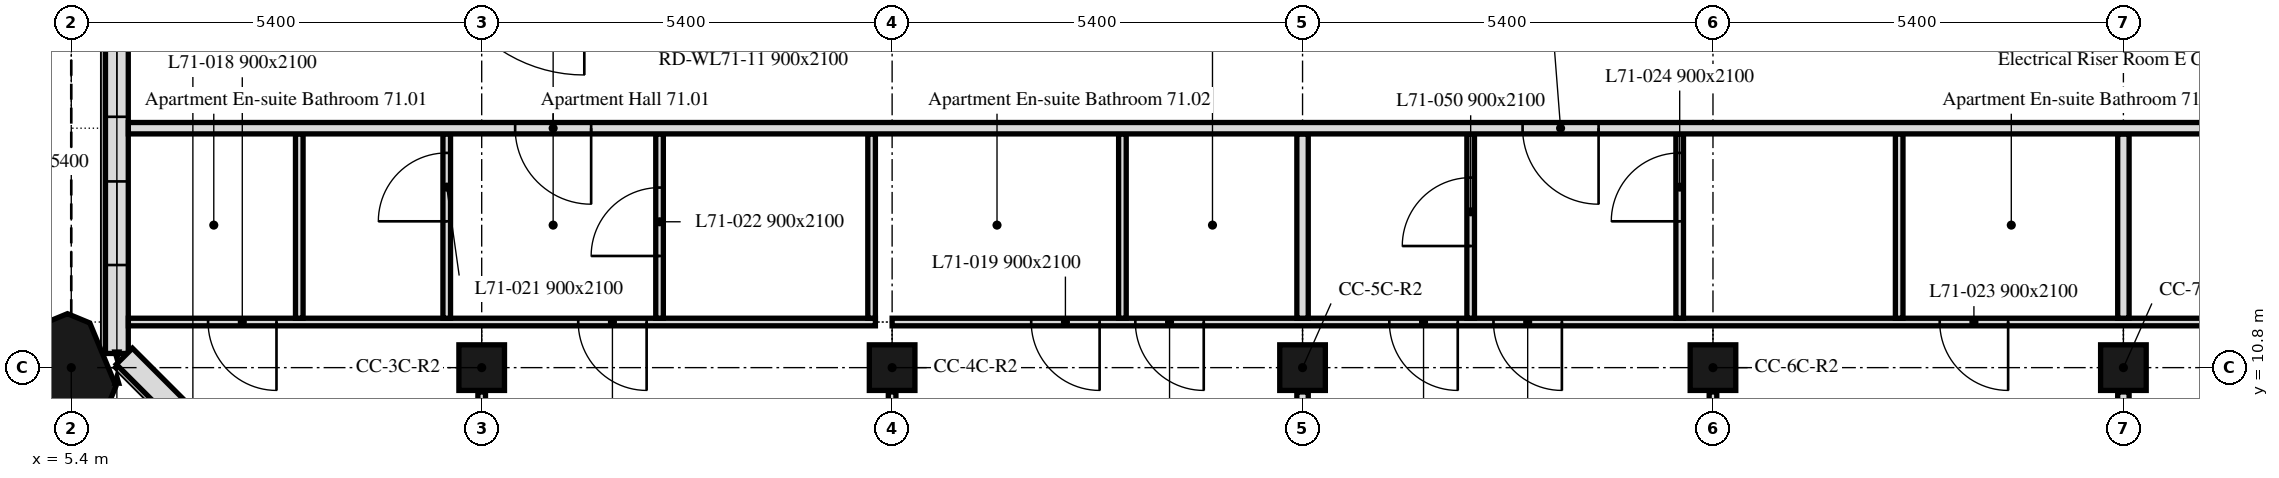
"""IFC4 building model, lengths in metres.
Left out: names, types, materials, properties, quantities, classifications, styles, units other than length and angle.
Written with IfcOpenShell. Run it as: python <this file> out.ifc"""

import sys

from ifc_helpers import new_model, si_unit, direction, frame, frame_2d, origin, origin_2d, place, context, subcontext, project, spatial, polyline, rectangle, outline, extrude, element, fill, save


model = new_model("IFC4")
c1 = context("Model", 3, precision=1e-05, world=origin(), true_north=direction((0.0, 1.0)))
c2 = subcontext(c1, "Body", "Model", "MODEL_VIEW")
j1 = project(units=[si_unit("LENGTHUNIT", "METRE"), si_unit("PLANEANGLEUNIT", "RADIAN")], contexts=[c1])
p1 = place(None, origin())
s1 = spatial("IfcSite", under=j1, at=p1, CompositionType="ELEMENT")
p2 = place(p1, origin())
s2 = spatial("IfcBuilding", under=s1, at=p2, CompositionType="ELEMENT")
p3 = place(p2, frame((0.0, 0.0, 288.4)))
s3 = spatial("IfcBuildingStorey", under=s2, at=p3, CompositionType="ELEMENT", Elevation=288.4)
p4 = place(p3, frame((5.4, 10.8, 0.0), z_axis=(0.0, 0.0, 1.0), x_axis=(-0.382683432365, 0.923879532511, 0.0)))
e1 = element("IfcColumn", 1, at=p4, inside=s3, PredefinedType="COLUMN", context=c2, shape_type="SweptSolid", body=[
    extrude(outline(polyline([(-0.45, -0.45), (0.45, -0.45), (0.675, -0.225), (0.675, 0.225), (0.45, 0.45), (-0.45, 0.45), (-0.675, 0.225), (-0.675, -0.225), (-0.45, -0.45)])), origin(), (0.0, 0.0, 1.0), 3.0),
])
for number, where, z_axis, x_axis in (
    (2, (10.8, 10.8, 0.0), (0.0, 0.0, 1.0), (1.0, 0.0, 0.0)),
    (3, (16.2, 10.8, 0.0), (0.0, 0.0, 1.0), (1.0, 0.0, 0.0)),
    (4, (21.6, 10.8, 0.0), (0.0, 0.0, 1.0), (1.0, 0.0, 0.0)),
    (5, (27.0, 10.8, 0.0), (0.0, 0.0, 1.0), (1.0, 0.0, 0.0)),
    (6, (32.4, 10.8, 0.0), (0.0, 0.0, 1.0), (1.0, 0.0, 0.0)),
):
    element("IfcColumn", number, at=place(p3, frame(where, z_axis=z_axis, x_axis=x_axis)), inside=s3, PredefinedType="COLUMN", context=c2, shape_type="SweptSolid", body=[
        extrude(rectangle(XDim=0.6, YDim=0.6, at=origin_2d()), origin(), (0.0, 0.0, 1.0), 3.0),
    ])
p5 = place(p3, frame((6.0, 16.2, 0.0), z_axis=(0.0, 0.0, 1.0), x_axis=(0.0, -1.0, 0.0)))
e7 = element("IfcWall", 7, at=p5, inside=s3, PredefinedType="SOLIDWALL", context=c2, shape_type="SweptSolid", body=[
    extrude(rectangle(XDim=5.214, YDim=0.3, at=frame_2d((2.607, 0.0))), origin(), (0.0, 0.0, 1.0), 3.0),
])
p6 = place(p5, frame((1.0, 0.0, 0.9)))
e8 = element("IfcOpeningElement", 8, at=p6, cuts=e7, PredefinedType="OPENING", context=c2, shape_type="SweptSolid", body=[
    extrude(rectangle(XDim=1.1, YDim=1.7, at=frame_2d((0.55, 0.85))), frame((0.0, 0.16, 0.0), z_axis=(0.0, -1.0, 0.0), x_axis=(1.0, 0.0, 0.0)), (0.0, 0.0, 1.0), 0.32),
])
p7 = place(p5, frame((2.95, 0.0, 0.9)))
e9 = element("IfcOpeningElement", 9, at=p7, cuts=e7, PredefinedType="OPENING", context=c2, shape_type="SweptSolid", body=[
    extrude(rectangle(XDim=1.1, YDim=1.7, at=frame_2d((0.55, 0.85))), frame((0.0, 0.16, 0.0), z_axis=(0.0, -1.0, 0.0), x_axis=(1.0, 0.0, 0.0)), (0.0, 0.0, 1.0), 0.32),
])
p8 = place(p3, frame((6.099, 10.949, 0.0), z_axis=(0.0, 0.0, 1.0), x_axis=(0.707106781187, -0.707106781187, 0.0)))
e10 = element("IfcWall", 10, at=p8, inside=s3, PredefinedType="SOLIDWALL", context=c2, shape_type="SweptSolid", body=[
    extrude(rectangle(XDim=6.86, YDim=0.3, at=frame_2d((3.43, 0.0))), origin(), (0.0, 0.0, 1.0), 3.0),
])
p9 = place(p8, frame((1.73, 0.0, 0.9)))
e11 = element("IfcOpeningElement", 11, at=p9, cuts=e10, PredefinedType="OPENING", context=c2, shape_type="SweptSolid", body=[
    extrude(rectangle(XDim=3.4, YDim=1.7, at=frame_2d((1.7, 0.85))), frame((0.0, 0.16, 0.0), z_axis=(0.0, -1.0, 0.0), x_axis=(1.0, 0.0, 0.0)), (0.0, 0.0, 1.0), 0.32),
])
p10 = place(p3, frame((15.98, 11.4, 0.0), z_axis=(0.0, 0.0, 1.0), x_axis=(-1.0, 0.0, 0.0)))
e12 = element("IfcWall", 12, at=p10, inside=s3, PredefinedType="PARTITIONING", context=c2, shape_type="SweptSolid", body=[
    extrude(rectangle(XDim=9.829, YDim=0.1, at=frame_2d((4.915, 0.0))), origin(), (0.0, 0.0, 1.0), 3.0),
])
p11 = place(p10, frame((7.88, 0.0, 0.0)))
e13 = element("IfcOpeningElement", 13, at=p11, cuts=e12, PredefinedType="OPENING", context=c2, shape_type="SweptSolid", body=[
    extrude(rectangle(XDim=0.9, YDim=2.1, at=frame_2d((0.45, 1.05))), frame((0.0, 0.05, 0.0), z_axis=(0.0, -1.0, 0.0), x_axis=(1.0, 0.0, 0.0)), (0.0, 0.0, 1.0), 0.1),
])
p12 = place(p10, frame((3.01, 0.0, 0.0)))
e14 = element("IfcOpeningElement", 14, at=p12, cuts=e12, PredefinedType="OPENING", context=c2, shape_type="SweptSolid", body=[
    extrude(rectangle(XDim=0.9, YDim=2.1, at=frame_2d((0.45, 1.05))), frame((0.0, 0.05, 0.0), z_axis=(0.0, -1.0, 0.0), x_axis=(1.0, 0.0, 0.0)), (0.0, 0.0, 1.0), 0.1),
])
p13 = place(p3, frame((10.8, 6.512, 0.0), z_axis=(0.0, 0.0, 1.0), x_axis=(0.0, 1.0, 0.0)))
e15 = element("IfcWall", 15, at=p13, inside=s3, PredefinedType="PARTITIONING", context=c2, shape_type="SweptSolid", body=[
    extrude(rectangle(XDim=3.968, YDim=0.1, at=frame_2d((1.984, 0.0))), origin(), (0.0, 0.0, 1.0), 3.0),
])
p14 = place(p13, frame((1.938, 0.0, 0.0)))
e16 = element("IfcOpeningElement", 16, at=p14, cuts=e15, PredefinedType="OPENING", context=c2, shape_type="SweptSolid", body=[
    extrude(rectangle(XDim=0.9, YDim=2.1, at=frame_2d((0.45, 1.05))), frame((0.0, 0.05, 0.0), z_axis=(0.0, -1.0, 0.0), x_axis=(1.0, 0.0, 0.0)), (0.0, 0.0, 1.0), 0.1),
])
p15 = place(p3, frame((16.2, 6.151, 0.0), z_axis=(0.0, 0.0, 1.0), x_axis=(0.0, 1.0, 0.0)))
e17 = element("IfcWall", 17, at=p15, inside=s3, PredefinedType="PARTITIONING", context=c2, shape_type="SweptSolid", body=[
    extrude(rectangle(XDim=4.329, YDim=0.1, at=frame_2d((2.165, 0.0))), origin(), (0.0, 0.0, 1.0), 3.0),
])
p16 = place(p15, frame((1.424, 0.0, 0.0)))
e18 = element("IfcOpeningElement", 18, at=p16, cuts=e17, PredefinedType="OPENING", context=c2, shape_type="SweptSolid", body=[
    extrude(rectangle(XDim=0.9, YDim=2.1, at=frame_2d((0.45, 1.05))), frame((0.0, 0.05, 0.0), z_axis=(0.0, -1.0, 0.0), x_axis=(1.0, 0.0, 0.0)), (0.0, 0.0, 1.0), 0.1),
])
p17 = place(p3, frame((37.8, 11.4, 0.0), z_axis=(0.0, 0.0, 1.0), x_axis=(-1.0, 0.0, 0.0)))
e19 = element("IfcWall", 19, at=p17, inside=s3, PredefinedType="PARTITIONING", context=c2, shape_type="SweptSolid", body=[
    extrude(rectangle(XDim=21.6, YDim=0.1, at=frame_2d((10.8, 0.0))), origin(), (0.0, 0.0, 1.0), 3.0),
])
p18 = place(p17, frame((18.87, 0.0, 0.0)))
e20 = element("IfcOpeningElement", 20, at=p18, cuts=e19, PredefinedType="OPENING", context=c2, shape_type="SweptSolid", body=[
    extrude(rectangle(XDim=0.9, YDim=2.1, at=frame_2d((0.45, 1.05))), frame((0.0, 0.05, 0.0), z_axis=(0.0, -1.0, 0.0), x_axis=(1.0, 0.0, 0.0)), (0.0, 0.0, 1.0), 0.1),
])
p19 = place(p17, frame((17.5, 0.0, 0.0)))
e21 = element("IfcOpeningElement", 21, at=p19, cuts=e19, PredefinedType="OPENING", context=c2, shape_type="SweptSolid", body=[
    extrude(rectangle(XDim=0.9, YDim=2.1, at=frame_2d((0.45, 1.05))), frame((0.0, 0.05, 0.0), z_axis=(0.0, -1.0, 0.0), x_axis=(1.0, 0.0, 0.0)), (0.0, 0.0, 1.0), 0.1),
])
p20 = place(p17, frame((6.917, 0.0, 0.0)))
e22 = element("IfcOpeningElement", 22, at=p20, cuts=e19, PredefinedType="OPENING", context=c2, shape_type="SweptSolid", body=[
    extrude(rectangle(XDim=0.9, YDim=2.1, at=frame_2d((0.45, 1.05))), frame((0.0, 0.05, 0.0), z_axis=(0.0, -1.0, 0.0), x_axis=(1.0, 0.0, 0.0)), (0.0, 0.0, 1.0), 0.1),
])
p21 = place(p17, frame((3.15, 0.0, 0.0)))
e23 = element("IfcOpeningElement", 23, at=p21, cuts=e19, PredefinedType="OPENING", context=c2, shape_type="SweptSolid", body=[
    extrude(rectangle(XDim=0.9, YDim=2.1, at=frame_2d((0.45, 1.05))), frame((0.0, 0.05, 0.0), z_axis=(0.0, -1.0, 0.0), x_axis=(1.0, 0.0, 0.0)), (0.0, 0.0, 1.0), 0.1),
])
p22 = place(p17, frame((14.158, 0.0, 0.0)))
e24 = element("IfcOpeningElement", 24, at=p22, cuts=e19, PredefinedType="OPENING", context=c2, shape_type="SweptSolid", body=[
    extrude(rectangle(XDim=0.9, YDim=2.1, at=frame_2d((0.45, 1.05))), frame((0.0, 0.05, 0.0), z_axis=(0.0, -1.0, 0.0), x_axis=(1.0, 0.0, 0.0)), (0.0, 0.0, 1.0), 0.1),
])
p23 = place(p17, frame((12.788, 0.0, 0.0)))
e25 = element("IfcOpeningElement", 25, at=p23, cuts=e19, PredefinedType="OPENING", context=c2, shape_type="SweptSolid", body=[
    extrude(rectangle(XDim=0.9, YDim=2.1, at=frame_2d((0.45, 1.05))), frame((0.0, 0.05, 0.0), z_axis=(0.0, -1.0, 0.0), x_axis=(1.0, 0.0, 0.0)), (0.0, 0.0, 1.0), 0.1),
])
p24 = place(p3, frame((21.6, 6.151, 0.0), z_axis=(0.0, 0.0, 1.0), x_axis=(0.0, 1.0, 0.0)))
e26 = element("IfcWall", 26, at=p24, inside=s3, PredefinedType="PARTITIONING", context=c2, shape_type="SweptSolid", body=[
    extrude(rectangle(XDim=4.329, YDim=0.15, at=frame_2d((2.165, 0.0))), origin(), (0.0, 0.0, 1.0), 3.0),
])
p25 = place(p3, frame((8.4, 11.45, 0.0), z_axis=(0.0, 0.0, 1.0), x_axis=(0.0, 1.0, 0.0)))
e27 = element("IfcWall", 27, at=p25, inside=s3, PredefinedType="PARTITIONING", context=c2, shape_type="SweptSolid", body=[
    extrude(rectangle(XDim=2.425, YDim=0.1, at=frame_2d((1.212, 0.0))), origin(), (0.0, 0.0, 1.0), 3.0),
])
p26 = place(p3, frame((10.34, 11.45, 0.0), z_axis=(0.0, 0.0, 1.0), x_axis=(0.0, 1.0, 0.0)))
e28 = element("IfcWall", 28, at=p26, inside=s3, PredefinedType="PARTITIONING", context=c2, shape_type="SweptSolid", body=[
    extrude(rectangle(XDim=2.425, YDim=0.1, at=frame_2d((1.212, 0.0))), origin(), (0.0, 0.0, 1.0), 3.0),
])
p27 = place(p26, frame((1.275, 0.0, 0.0)))
e29 = element("IfcOpeningElement", 29, at=p27, cuts=e28, PredefinedType="OPENING", context=c2, shape_type="SweptSolid", body=[
    extrude(rectangle(XDim=0.9, YDim=2.1, at=frame_2d((0.45, 1.05))), frame((0.0, 0.05, 0.0), z_axis=(0.0, -1.0, 0.0), x_axis=(1.0, 0.0, 0.0)), (0.0, 0.0, 1.0), 0.1),
])
p28 = place(p3, frame((13.14, 11.45, 0.0), z_axis=(0.0, 0.0, 1.0), x_axis=(0.0, 1.0, 0.0)))
e30 = element("IfcWall", 30, at=p28, inside=s3, PredefinedType="PARTITIONING", context=c2, shape_type="SweptSolid", body=[
    extrude(rectangle(XDim=2.425, YDim=0.1, at=frame_2d((1.212, 0.0))), origin(), (0.0, 0.0, 1.0), 3.0),
])
p29 = place(p28, frame((0.819, 0.0, 0.0)))
e31 = element("IfcOpeningElement", 31, at=p29, cuts=e30, PredefinedType="OPENING", context=c2, shape_type="SweptSolid", body=[
    extrude(rectangle(XDim=0.9, YDim=2.1, at=frame_2d((0.45, 1.05))), frame((0.0, 0.05, 0.0), z_axis=(0.0, -1.0, 0.0), x_axis=(1.0, 0.0, 0.0)), (0.0, 0.0, 1.0), 0.1),
])
for number, where, z_axis, x_axis in (
    (32, (15.93, 11.45, 0.0), (0.0, 0.0, 1.0), (0.0, 1.0, 0.0)),
    (33, (19.23, 11.45, 0.0), (0.0, 0.0, 1.0), (0.0, 1.0, 0.0)),
):
    element("IfcWall", number, at=place(p3, frame(where, z_axis=z_axis, x_axis=x_axis)), inside=s3, PredefinedType="PARTITIONING", context=c2, shape_type="SweptSolid", body=[
        extrude(rectangle(XDim=2.425, YDim=0.1, at=frame_2d((1.212, 0.0))), origin(), (0.0, 0.0, 1.0), 3.0),
    ])
p30 = place(p3, frame((21.6, 11.45, 0.0), z_axis=(0.0, 0.0, 1.0), x_axis=(0.0, 1.0, 0.0)))
e34 = element("IfcWall", 34, at=p30, inside=s3, PredefinedType="PARTITIONING", context=c2, shape_type="SweptSolid", body=[
    extrude(rectangle(XDim=2.425, YDim=0.15, at=frame_2d((1.212, 0.0))), origin(), (0.0, 0.0, 1.0), 3.0),
])
p31 = place(p3, frame((27.0, 6.151, 0.0), z_axis=(0.0, 0.0, 1.0), x_axis=(0.0, 1.0, 0.0)))
e35 = element("IfcWall", 35, at=p31, inside=s3, PredefinedType="PARTITIONING", context=c2, shape_type="SweptSolid", body=[
    extrude(rectangle(XDim=4.329, YDim=0.1, at=frame_2d((2.165, 0.0))), origin(), (0.0, 0.0, 1.0), 3.0),
])
p32 = place(p31, frame((1.424, 0.0, 0.0)))
e36 = element("IfcOpeningElement", 36, at=p32, cuts=e35, PredefinedType="OPENING", context=c2, shape_type="SweptSolid", body=[
    extrude(rectangle(XDim=0.9, YDim=2.1, at=frame_2d((0.45, 1.05))), frame((0.0, 0.05, 0.0), z_axis=(0.0, -1.0, 0.0), x_axis=(1.0, 0.0, 0.0)), (0.0, 0.0, 1.0), 0.1),
])
p33 = place(p3, frame((32.4, 6.151, 0.0), z_axis=(0.0, 0.0, 1.0), x_axis=(0.0, 1.0, 0.0)))
e37 = element("IfcWall", 37, at=p33, inside=s3, PredefinedType="PARTITIONING", context=c2, shape_type="SweptSolid", body=[
    extrude(rectangle(XDim=4.329, YDim=0.15, at=frame_2d((2.165, 0.0))), origin(), (0.0, 0.0, 1.0), 3.0),
])
p34 = place(p3, frame((23.812, 11.45, 0.0), z_axis=(0.0, 0.0, 1.0), x_axis=(0.0, 1.0, 0.0)))
e38 = element("IfcWall", 38, at=p34, inside=s3, PredefinedType="PARTITIONING", context=c2, shape_type="SweptSolid", body=[
    extrude(rectangle(XDim=2.425, YDim=0.1, at=frame_2d((1.212, 0.0))), origin(), (0.0, 0.0, 1.0), 3.0),
])
p35 = place(p34, frame((0.95, 0.0, 0.0)))
e39 = element("IfcOpeningElement", 39, at=p35, cuts=e38, PredefinedType="OPENING", context=c2, shape_type="SweptSolid", body=[
    extrude(rectangle(XDim=0.9, YDim=2.1, at=frame_2d((0.45, 1.05))), frame((0.0, 0.05, 0.0), z_axis=(0.0, -1.0, 0.0), x_axis=(1.0, 0.0, 0.0)), (0.0, 0.0, 1.0), 0.1),
])
p36 = place(p3, frame((26.562, 11.45, 0.0), z_axis=(0.0, 0.0, 1.0), x_axis=(0.0, 1.0, 0.0)))
e40 = element("IfcWall", 40, at=p36, inside=s3, PredefinedType="PARTITIONING", context=c2, shape_type="SweptSolid", body=[
    extrude(rectangle(XDim=2.425, YDim=0.1, at=frame_2d((1.212, 0.0))), origin(), (0.0, 0.0, 1.0), 3.0),
])
p37 = place(p36, frame((1.275, 0.0, 0.0)))
e41 = element("IfcOpeningElement", 41, at=p37, cuts=e40, PredefinedType="OPENING", context=c2, shape_type="SweptSolid", body=[
    extrude(rectangle(XDim=0.9, YDim=2.1, at=frame_2d((0.45, 1.05))), frame((0.0, 0.05, 0.0), z_axis=(0.0, -1.0, 0.0), x_axis=(1.0, 0.0, 0.0)), (0.0, 0.0, 1.0), 0.1),
])
p38 = place(p3, frame((29.45, 11.45, 0.0), z_axis=(0.0, 0.0, 1.0), x_axis=(0.0, 1.0, 0.0)))
e42 = element("IfcWall", 42, at=p38, inside=s3, PredefinedType="PARTITIONING", context=c2, shape_type="SweptSolid", body=[
    extrude(rectangle(XDim=2.425, YDim=0.1, at=frame_2d((1.212, 0.0))), origin(), (0.0, 0.0, 1.0), 3.0),
])
p39 = place(p3, frame((32.4, 11.45, 0.0), z_axis=(0.0, 0.0, 1.0), x_axis=(0.0, 1.0, 0.0)))
e43 = element("IfcWall", 43, at=p39, inside=s3, PredefinedType="PARTITIONING", context=c2, shape_type="SweptSolid", body=[
    extrude(rectangle(XDim=2.425, YDim=0.15, at=frame_2d((1.212, 0.0))), origin(), (0.0, 0.0, 1.0), 3.0),
])
p40 = place(p3, frame((47.849, 13.95, 0.0), z_axis=(0.0, 0.0, 1.0), x_axis=(-1.0, 0.0, 0.0)))
e44 = element("IfcWall", 44, at=p40, inside=s3, PredefinedType="PARTITIONING", context=c2, shape_type="SweptSolid", body=[
    extrude(rectangle(XDim=41.698, YDim=0.15, at=frame_2d((20.849, 0.0))), origin(), (0.0, 0.0, 1.0), 3.0),
])
p41 = place(p40, frame((35.609, 0.0, 0.0)))
e45 = element("IfcOpeningElement", 45, at=p41, cuts=e44, PredefinedType="OPENING", context=c2, shape_type="SweptSolid", body=[
    extrude(rectangle(XDim=1.0, YDim=2.1, at=frame_2d((0.5, 1.05))), frame((0.0, 0.075, 0.0), z_axis=(0.0, -1.0, 0.0), x_axis=(1.0, 0.0, 0.0)), (0.0, 0.0, 1.0), 0.15),
])
p42 = place(p40, frame((22.354, 0.0, 0.0)))
e46 = element("IfcOpeningElement", 46, at=p42, cuts=e44, PredefinedType="OPENING", context=c2, shape_type="SweptSolid", body=[
    extrude(rectangle(XDim=1.0, YDim=2.1, at=frame_2d((0.5, 1.05))), frame((0.0, 0.075, 0.0), z_axis=(0.0, -1.0, 0.0), x_axis=(1.0, 0.0, 0.0)), (0.0, 0.0, 1.0), 0.15),
])
p43 = place(p40, frame((8.049, 0.0, 0.0)))
e47 = element("IfcOpeningElement", 47, at=p43, cuts=e44, PredefinedType="OPENING", context=c2, shape_type="SweptSolid", body=[
    extrude(rectangle(XDim=1.0, YDim=2.1, at=frame_2d((0.5, 1.05))), frame((0.0, 0.075, 0.0), z_axis=(0.0, -1.0, 0.0), x_axis=(1.0, 0.0, 0.0)), (0.0, 0.0, 1.0), 0.15),
])
p44 = place(p6, origin())
e48 = element("IfcWindow", 48, at=p44, inside=s3, PartitioningType="SINGLE_PANEL", PredefinedType="WINDOW", context=c2, shape_type="SweptSolid", body=[
    extrude(rectangle(XDim=1.1, YDim=1.7, at=frame_2d((0.55, 0.85))), frame((0.0, 0.03, 0.0), z_axis=(0.0, -1.0, 0.0), x_axis=(1.0, 0.0, 0.0)), (0.0, 0.0, 1.0), 0.06),
])
fill(e8, e48)
p45 = place(p7, origin())
e49 = element("IfcWindow", 49, at=p45, inside=s3, PartitioningType="SINGLE_PANEL", PredefinedType="WINDOW", context=c2, shape_type="SweptSolid", body=[
    extrude(rectangle(XDim=1.1, YDim=1.7, at=frame_2d((0.55, 0.85))), frame((0.0, 0.03, 0.0), z_axis=(0.0, -1.0, 0.0), x_axis=(1.0, 0.0, 0.0)), (0.0, 0.0, 1.0), 0.06),
])
fill(e9, e49)
p46 = place(p11, origin())
e50 = element("IfcDoor", 50, at=p46, inside=s3, OperationType="SINGLE_SWING_RIGHT", PredefinedType="DOOR", context=c2, shape_type="SweptSolid", body=[
    extrude(rectangle(XDim=0.9, YDim=2.1, at=frame_2d((0.45, 1.05))), frame((0.0, 0.025, 0.0), z_axis=(0.0, -1.0, 0.0), x_axis=(1.0, 0.0, 0.0)), (0.0, 0.0, 1.0), 0.05),
])
fill(e13, e50)
p47 = place(p18, origin())
e51 = element("IfcDoor", 51, at=p47, inside=s3, OperationType="SINGLE_SWING_LEFT", PredefinedType="DOOR", context=c2, shape_type="SweptSolid", body=[
    extrude(rectangle(XDim=0.9, YDim=2.1, at=frame_2d((0.45, 1.05))), frame((0.0, 0.025, 0.0), z_axis=(0.0, -1.0, 0.0), x_axis=(1.0, 0.0, 0.0)), (0.0, 0.0, 1.0), 0.05),
])
fill(e20, e51)
p48 = place(p19, origin())
e52 = element("IfcDoor", 52, at=p48, inside=s3, OperationType="SINGLE_SWING_RIGHT", PredefinedType="DOOR", context=c2, shape_type="SweptSolid", body=[
    extrude(rectangle(XDim=0.9, YDim=2.1, at=frame_2d((0.45, 1.05))), frame((0.0, 0.025, 0.0), z_axis=(0.0, -1.0, 0.0), x_axis=(1.0, 0.0, 0.0)), (0.0, 0.0, 1.0), 0.05),
])
fill(e21, e52)
p49 = place(p27, origin())
e53 = element("IfcDoor", 53, at=p49, inside=s3, OperationType="SINGLE_SWING_RIGHT", PredefinedType="DOOR", context=c2, shape_type="SweptSolid", body=[
    extrude(rectangle(XDim=0.9, YDim=2.1, at=frame_2d((0.45, 1.05))), frame((0.0, 0.025, 0.0), z_axis=(0.0, -1.0, 0.0), x_axis=(1.0, 0.0, 0.0)), (0.0, 0.0, 1.0), 0.05),
])
fill(e29, e53)
p50 = place(p29, origin())
e54 = element("IfcDoor", 54, at=p50, inside=s3, OperationType="SINGLE_SWING_LEFT", PredefinedType="DOOR", context=c2, shape_type="SweptSolid", body=[
    extrude(rectangle(XDim=0.9, YDim=2.1, at=frame_2d((0.45, 1.05))), frame((0.0, 0.025, 0.0), z_axis=(0.0, -1.0, 0.0), x_axis=(1.0, 0.0, 0.0)), (0.0, 0.0, 1.0), 0.05),
])
fill(e31, e54)
p51 = place(p20, origin())
e55 = element("IfcDoor", 55, at=p51, inside=s3, OperationType="SINGLE_SWING_LEFT", PredefinedType="DOOR", context=c2, shape_type="SweptSolid", body=[
    extrude(rectangle(XDim=0.9, YDim=2.1, at=frame_2d((0.45, 1.05))), frame((0.0, 0.025, 0.0), z_axis=(0.0, -1.0, 0.0), x_axis=(1.0, 0.0, 0.0)), (0.0, 0.0, 1.0), 0.05),
])
fill(e22, e55)
p52 = place(p37, origin())
e56 = element("IfcDoor", 56, at=p52, inside=s3, OperationType="SINGLE_SWING_LEFT", PredefinedType="DOOR", context=c2, shape_type="SweptSolid", body=[
    extrude(rectangle(XDim=0.9, YDim=2.1, at=frame_2d((0.45, 1.05))), frame((0.0, 0.025, 0.0), z_axis=(0.0, -1.0, 0.0), x_axis=(1.0, 0.0, 0.0)), (0.0, 0.0, 1.0), 0.05),
])
fill(e41, e56)
p53 = place(p22, origin())
e57 = element("IfcDoor", 57, at=p53, inside=s3, OperationType="SINGLE_SWING_RIGHT", PredefinedType="DOOR", context=c2, shape_type="SweptSolid", body=[
    extrude(rectangle(XDim=0.9, YDim=2.1, at=frame_2d((0.45, 1.05))), frame((0.0, 0.025, 0.0), z_axis=(0.0, -1.0, 0.0), x_axis=(1.0, 0.0, 0.0)), (0.0, 0.0, 1.0), 0.05),
])
fill(e24, e57)
p54 = place(p35, origin())
e58 = element("IfcDoor", 58, at=p54, inside=s3, OperationType="SINGLE_SWING_LEFT", PredefinedType="DOOR", context=c2, shape_type="SweptSolid", body=[
    extrude(rectangle(XDim=0.9, YDim=2.1, at=frame_2d((0.45, 1.05))), frame((0.0, 0.025, 0.0), z_axis=(0.0, -1.0, 0.0), x_axis=(1.0, 0.0, 0.0)), (0.0, 0.0, 1.0), 0.05),
])
fill(e39, e58)
p55 = place(p12, origin())
e59 = element("IfcDoor", 59, at=p55, inside=s3, OperationType="SINGLE_SWING_RIGHT", PredefinedType="DOOR", context=c2, shape_type="SweptSolid", body=[
    extrude(rectangle(XDim=0.9, YDim=2.1, at=frame_2d((0.45, 1.05))), frame((0.0, 0.025, 0.0), z_axis=(0.0, -1.0, 0.0), x_axis=(1.0, 0.0, 0.0)), (0.0, 0.0, 1.0), 0.05),
])
fill(e14, e59)
p56 = place(p41, origin())
e60 = element("IfcDoor", 60, at=p56, inside=s3, OperationType="SINGLE_SWING_RIGHT", PredefinedType="DOOR", context=c2, shape_type="SweptSolid", body=[
    extrude(rectangle(XDim=1.0, YDim=2.1, at=frame_2d((0.5, 1.05))), frame((0.0, 0.025, 0.0), z_axis=(0.0, -1.0, 0.0), x_axis=(1.0, 0.0, 0.0)), (0.0, 0.0, 1.0), 0.05),
])
fill(e45, e60)
p57 = place(p23, origin())
e61 = element("IfcDoor", 61, at=p57, inside=s3, OperationType="SINGLE_SWING_LEFT", PredefinedType="DOOR", context=c2, shape_type="SweptSolid", body=[
    extrude(rectangle(XDim=0.9, YDim=2.1, at=frame_2d((0.45, 1.05))), frame((0.0, 0.025, 0.0), z_axis=(0.0, -1.0, 0.0), x_axis=(1.0, 0.0, 0.0)), (0.0, 0.0, 1.0), 0.05),
])
fill(e25, e61)
p58 = place(p42, origin())
e62 = element("IfcDoor", 62, at=p58, inside=s3, OperationType="SINGLE_SWING_LEFT", PredefinedType="DOOR", context=c2, shape_type="SweptSolid", body=[
    extrude(rectangle(XDim=1.0, YDim=2.1, at=frame_2d((0.5, 1.05))), frame((0.0, 0.025, 0.0), z_axis=(0.0, -1.0, 0.0), x_axis=(1.0, 0.0, 0.0)), (0.0, 0.0, 1.0), 0.05),
])
fill(e46, e62)
save(model, sys.argv[1])
